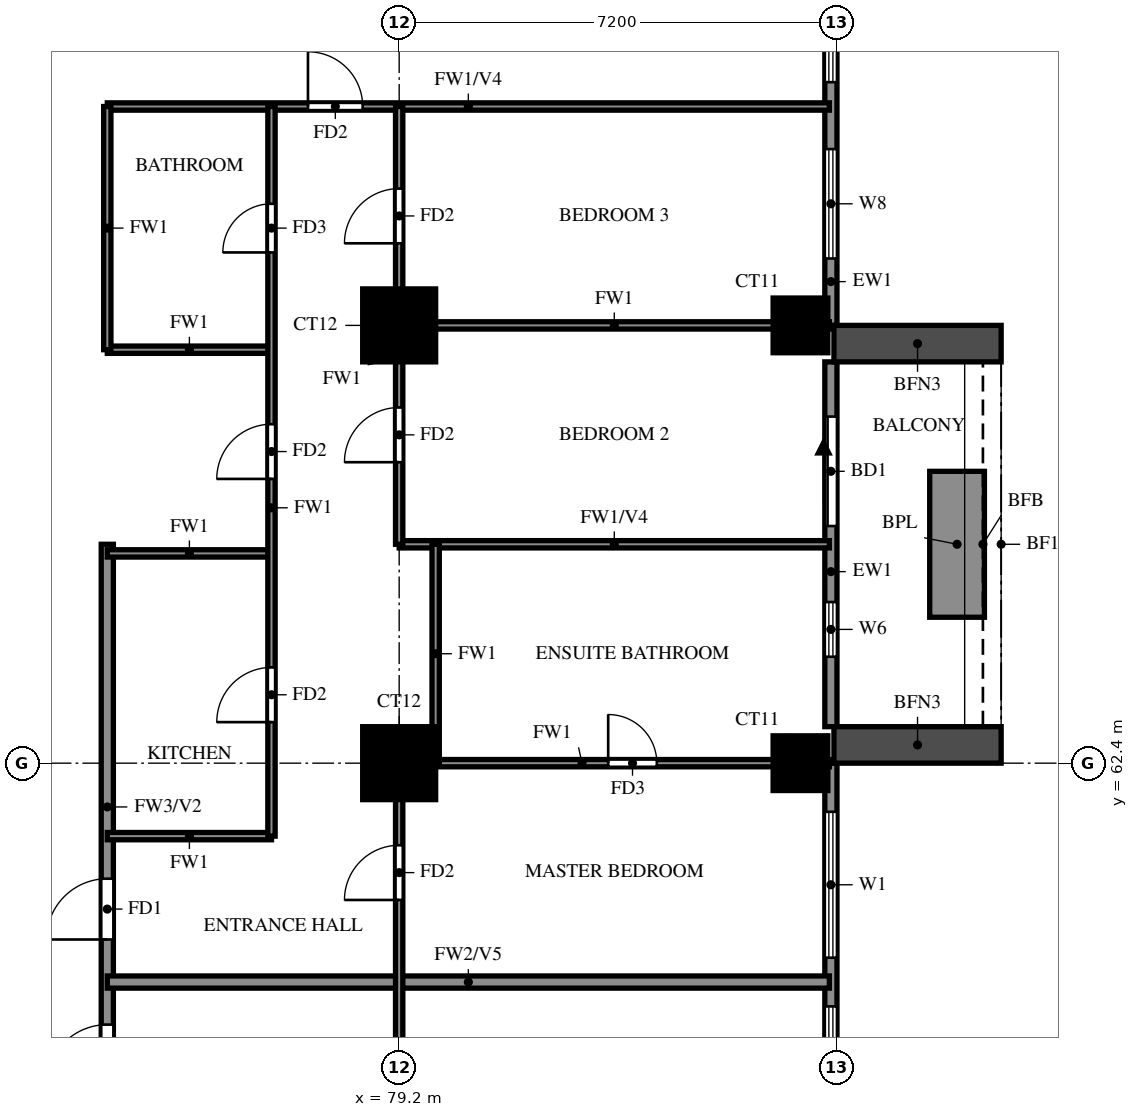
"""IFC4 building model, lengths in metres.
Left out: names, types, materials, properties, quantities, classifications, styles, units other than length and angle.
Written with IfcOpenShell. Run it as: python <this file> out.ifc"""

import sys

from ifc_helpers import new_model, si_unit, direction, frame, frame_2d, origin, origin_2d, place, context, subcontext, project, spatial, rectangle, extrude, source, transform, mapped, element, fill, save


model = new_model("IFC4")
c1 = context("Model", 3, precision=1e-05, world=origin(), true_north=direction((0.0, 1.0)))
c2 = subcontext(c1, "Body", "Model", "MODEL_VIEW")
j1 = project(units=[si_unit("LENGTHUNIT", "METRE"), si_unit("PLANEANGLEUNIT", "RADIAN")], contexts=[c1])
p1 = place(None, origin())
s1 = spatial("IfcSite", under=j1, at=p1, CompositionType="ELEMENT")
p2 = place(p1, origin())
s2 = spatial("IfcBuilding", under=s1, at=p2, CompositionType="ELEMENT")
p3 = place(p2, frame((0.0, 0.0, 97.0)))
s3 = spatial("IfcBuildingStorey", under=s2, at=p3, CompositionType="ELEMENT", Elevation=97.0)
m1 = source(origin(), c2, "Body", "SweptSolid", [
    extrude(rectangle(XDim=1.2, YDim=1.2, at=origin_2d()), origin(), (0.0, 0.0, 1.0), 3.18),
])
p4 = place(p3, frame((79.2, 62.4, 0.0), z_axis=(0.0, 0.0, 1.0), x_axis=(1.0, 0.0, 0.0)))
e1 = element("IfcColumn", 1, at=p4, inside=s3, PredefinedType="COLUMN", context=c2, shape_type="MappedRepresentation", body=[
    mapped(m1, transform((0.0, 0.0, 0.0))),
])
m2 = source(origin(), c2, "Body", "SweptSolid", [
    extrude(rectangle(XDim=0.9, YDim=0.9, at=origin_2d()), origin(), (0.0, 0.0, 1.0), 3.18),
])
p5 = place(p3, frame((85.8, 62.4, 0.0), z_axis=(0.0, 0.0, 1.0), x_axis=(1.0, 0.0, 0.0)))
e2 = element("IfcColumn", 2, at=p5, inside=s3, PredefinedType="COLUMN", context=c2, shape_type="MappedRepresentation", body=[
    mapped(m2, transform((0.0, 0.0, 0.0))),
])
p6 = place(p3, frame((79.2, 69.6, 0.0), z_axis=(0.0, 0.0, 1.0), x_axis=(1.0, 0.0, 0.0)))
e3 = element("IfcColumn", 3, at=p6, inside=s3, PredefinedType="COLUMN", context=c2, shape_type="MappedRepresentation", body=[
    mapped(m1, transform((0.0, 0.0, 0.0))),
])
p7 = place(p3, frame((85.8, 69.6, 0.0), z_axis=(0.0, 0.0, 1.0), x_axis=(1.0, 0.0, 0.0)))
e4 = element("IfcColumn", 4, at=p7, inside=s3, PredefinedType="COLUMN", context=c2, shape_type="MappedRepresentation", body=[
    mapped(m2, transform((0.0, 0.0, 0.0))),
])
p8 = place(p3, frame((86.3, 48.2, 0.0), z_axis=(0.0, 0.0, 1.0), x_axis=(0.0, 1.0, 0.0)))
e5 = element("IfcWall", 5, at=p8, inside=s3, PredefinedType="SOLIDWALL", context=c2, shape_type="SweptSolid", body=[
    extrude(rectangle(XDim=14.2, YDim=0.2, at=frame_2d((7.1, 0.0))), origin(), (0.0, 0.0, 1.0), 3.18),
])
p9 = place(p8, frame((0.6, 0.0, 0.6)))
e6 = element("IfcOpeningElement", 6, at=p9, cuts=e5, PredefinedType="OPENING", context=c2, shape_type="SweptSolid", body=[
    extrude(rectangle(XDim=2.4, YDim=2.4, at=frame_2d((1.2, 1.2))), frame((0.0, 0.11, 0.0), z_axis=(0.0, -1.0, 0.0), x_axis=(1.0, 0.0, 0.0)), (0.0, 0.0, 1.0), 0.22),
])
p10 = place(p8, frame((3.8, 0.0, 0.6)))
e7 = element("IfcOpeningElement", 7, at=p10, cuts=e5, PredefinedType="OPENING", context=c2, shape_type="SweptSolid", body=[
    extrude(rectangle(XDim=2.4, YDim=2.4, at=frame_2d((1.2, 1.2))), frame((0.0, 0.11, 0.0), z_axis=(0.0, -1.0, 0.0), x_axis=(1.0, 0.0, 0.0)), (0.0, 0.0, 1.0), 0.22),
])
p11 = place(p8, frame((7.8, 0.0, 0.6)))
e8 = element("IfcOpeningElement", 8, at=p11, cuts=e5, PredefinedType="OPENING", context=c2, shape_type="SweptSolid", body=[
    extrude(rectangle(XDim=2.4, YDim=2.4, at=frame_2d((1.2, 1.2))), frame((0.0, 0.11, 0.0), z_axis=(0.0, -1.0, 0.0), x_axis=(1.0, 0.0, 0.0)), (0.0, 0.0, 1.0), 0.22),
])
p12 = place(p8, frame((11.0, 0.0, 0.6)))
e9 = element("IfcOpeningElement", 9, at=p12, cuts=e5, PredefinedType="OPENING", context=c2, shape_type="SweptSolid", body=[
    extrude(rectangle(XDim=2.4, YDim=2.4, at=frame_2d((1.2, 1.2))), frame((0.0, 0.11, 0.0), z_axis=(0.0, -1.0, 0.0), x_axis=(1.0, 0.0, 0.0)), (0.0, 0.0, 1.0), 0.22),
])
p13 = place(p3, frame((86.3, 63.0, 0.0), z_axis=(0.0, 0.0, 1.0), x_axis=(0.0, 1.0, 0.0)))
e10 = element("IfcWall", 10, at=p13, inside=s3, PredefinedType="SOLIDWALL", context=c2, shape_type="SweptSolid", body=[
    extrude(rectangle(XDim=6.0, YDim=0.2, at=frame_2d((3.0, 0.0))), origin(), (0.0, 0.0, 1.0), 3.18),
])
p14 = place(p13, frame((3.3, 0.0, 0.0)))
e11 = element("IfcOpeningElement", 11, at=p14, cuts=e10, PredefinedType="OPENING", context=c2, shape_type="SweptSolid", body=[
    extrude(rectangle(XDim=1.8, YDim=2.4, at=frame_2d((0.9, 1.2))), frame((0.0, 0.11, 0.0), z_axis=(0.0, -1.0, 0.0), x_axis=(1.0, 0.0, 0.0)), (0.0, 0.0, 1.0), 0.22),
])
p15 = place(p13, frame((1.15, 0.0, 1.5)))
e12 = element("IfcOpeningElement", 12, at=p15, cuts=e10, PredefinedType="OPENING", context=c2, shape_type="SweptSolid", body=[
    extrude(rectangle(XDim=0.9, YDim=0.9, at=frame_2d((0.45, 0.45))), frame((0.0, 0.11, 0.0), z_axis=(0.0, -1.0, 0.0), x_axis=(1.0, 0.0, 0.0)), (0.0, 0.0, 1.0), 0.22),
])
p16 = place(p3, frame((86.3, 69.6, 0.0), z_axis=(0.0, 0.0, 1.0), x_axis=(0.0, 1.0, 0.0)))
e13 = element("IfcWall", 13, at=p16, inside=s3, PredefinedType="SOLIDWALL", context=c2, shape_type="SweptSolid", body=[
    extrude(rectangle(XDim=7.2, YDim=0.2, at=frame_2d((3.6, 0.0))), origin(), (0.0, 0.0, 1.0), 3.18),
])
p17 = place(p16, frame((1.1, 0.0, 0.6)))
e14 = element("IfcOpeningElement", 14, at=p17, cuts=e13, PredefinedType="OPENING", context=c2, shape_type="SweptSolid", body=[
    extrude(rectangle(XDim=1.8, YDim=2.4, at=frame_2d((0.9, 1.2))), frame((0.0, 0.11, 0.0), z_axis=(0.0, -1.0, 0.0), x_axis=(1.0, 0.0, 0.0)), (0.0, 0.0, 1.0), 0.22),
])
p18 = place(p16, frame((4.0, 0.0, 0.6)))
e15 = element("IfcOpeningElement", 15, at=p18, cuts=e13, PredefinedType="OPENING", context=c2, shape_type="SweptSolid", body=[
    extrude(rectangle(XDim=2.4, YDim=2.4, at=frame_2d((1.2, 1.2))), frame((0.0, 0.11, 0.0), z_axis=(0.0, -1.0, 0.0), x_axis=(1.0, 0.0, 0.0)), (0.0, 0.0, 1.0), 0.22),
])
for number, where, z_axis, x_axis in (
    (16, (86.35, 62.7, 0.0), (0.0, 0.0, 1.0), (1.0, 0.0, 0.0)),
    (17, (86.35, 69.3, 0.0), (0.0, 0.0, 1.0), (1.0, 0.0, 0.0)),
):
    element("IfcWall", number, at=place(p3, frame(where, z_axis=z_axis, x_axis=x_axis)), inside=s3, PredefinedType="SOLIDWALL", context=c2, shape_type="SweptSolid", body=[
        extrude(rectangle(XDim=2.75, YDim=0.6, at=frame_2d((1.375, 0.0))), origin(), (0.0, 0.0, 1.0), 2.85),
    ])
p19 = place(p3, frame((88.375, 64.8, 0.0), z_axis=(0.0, 0.0, 1.0), x_axis=(0.0, 1.0, 0.0)))
e18 = element("IfcWall", 18, at=p19, inside=s3, PredefinedType="SOLIDWALL", context=c2, shape_type="SweptSolid", body=[
    extrude(rectangle(XDim=2.4, YDim=0.9, at=frame_2d((1.2, 0.0))), origin(), (0.0, 0.0, 1.0), 0.9),
])
p20 = place(p3, frame((74.4, 56.4, 0.0), z_axis=(0.0, 0.0, 1.0), x_axis=(0.0, 1.0, 0.0)))
e19 = element("IfcWall", 19, at=p20, inside=s3, PredefinedType="SOLIDWALL", context=c2, shape_type="SweptSolid", body=[
    extrude(rectangle(XDim=9.6, YDim=0.2, at=frame_2d((4.8, 0.0))), origin(), (0.0, 0.0, 1.0), 3.18),
])
p21 = place(p20, frame((0.7, 0.0, 0.0)))
e20 = element("IfcOpeningElement", 20, at=p21, cuts=e19, PredefinedType="OPENING", context=c2, shape_type="SweptSolid", body=[
    extrude(rectangle(XDim=1.0, YDim=2.1, at=frame_2d((0.5, 1.05))), frame((0.0, 0.11, 0.0), z_axis=(0.0, -1.0, 0.0), x_axis=(1.0, 0.0, 0.0)), (0.0, 0.0, 1.0), 0.22),
])
p22 = place(p20, frame((3.1, 0.0, 0.0)))
e21 = element("IfcOpeningElement", 21, at=p22, cuts=e19, PredefinedType="OPENING", context=c2, shape_type="SweptSolid", body=[
    extrude(rectangle(XDim=1.0, YDim=2.1, at=frame_2d((0.5, 1.05))), frame((0.0, 0.11, 0.0), z_axis=(0.0, -1.0, 0.0), x_axis=(1.0, 0.0, 0.0)), (0.0, 0.0, 1.0), 0.22),
])
p23 = place(p3, frame((74.4, 58.8, 0.0), z_axis=(0.0, 0.0, 1.0), x_axis=(1.0, 0.0, 0.0)))
e22 = element("IfcWall", 22, at=p23, inside=s3, PredefinedType="SOLIDWALL", context=c2, shape_type="SweptSolid", body=[
    extrude(rectangle(XDim=11.875, YDim=0.2, at=frame_2d((5.938, 0.0))), origin(), (0.0, 0.0, 1.0), 2.28),
])
p24 = place(p3, frame((74.4, 61.2, 0.0), z_axis=(0.0, 0.0, 1.0), x_axis=(1.0, 0.0, 0.0)))
e23 = element("IfcWall", 23, at=p24, inside=s3, PredefinedType="PARTITIONING", context=c2, shape_type="SweptSolid", body=[
    extrude(rectangle(XDim=2.7, YDim=0.12, at=frame_2d((1.35, 0.0))), origin(), (0.0, 0.0, 1.0), 3.18),
])
p25 = place(p3, frame((79.2, 62.4, 0.0), z_axis=(0.0, 0.0, 1.0), x_axis=(1.0, 0.0, 0.0)))
e24 = element("IfcWall", 24, at=p25, inside=s3, PredefinedType="PARTITIONING", context=c2, shape_type="SweptSolid", body=[
    extrude(rectangle(XDim=7.075, YDim=0.12, at=frame_2d((3.538, 0.0))), origin(), (0.0, 0.0, 1.0), 3.18),
])
p26 = place(p25, frame((3.438, 0.0, 0.0)))
e25 = element("IfcOpeningElement", 25, at=p26, cuts=e24, PredefinedType="OPENING", context=c2, shape_type="SweptSolid", body=[
    extrude(rectangle(XDim=0.8, YDim=2.1, at=frame_2d((0.4, 1.05))), frame((0.0, 0.07, 0.0), z_axis=(0.0, -1.0, 0.0), x_axis=(1.0, 0.0, 0.0)), (0.0, 0.0, 1.0), 0.14),
])
p27 = place(p3, frame((74.4, 65.85, 0.0), z_axis=(0.0, 0.0, 1.0), x_axis=(1.0, 0.0, 0.0)))
e26 = element("IfcWall", 26, at=p27, inside=s3, PredefinedType="PARTITIONING", context=c2, shape_type="SweptSolid", body=[
    extrude(rectangle(XDim=2.7, YDim=0.12, at=frame_2d((1.35, 0.0))), origin(), (0.0, 0.0, 1.0), 3.18),
])
p28 = place(p3, frame((79.2, 66.0, 0.0), z_axis=(0.0, 0.0, 1.0), x_axis=(1.0, 0.0, 0.0)))
e27 = element("IfcWall", 27, at=p28, inside=s3, PredefinedType="PARTITIONING", context=c2, shape_type="SweptSolid", body=[
    extrude(rectangle(XDim=7.075, YDim=0.12, at=frame_2d((3.538, 0.0))), origin(), (0.0, 0.0, 1.0), 2.28),
])
p29 = place(p3, frame((74.4, 69.2, 0.0), z_axis=(0.0, 0.0, 1.0), x_axis=(1.0, 0.0, 0.0)))
e28 = element("IfcWall", 28, at=p29, inside=s3, PredefinedType="PARTITIONING", context=c2, shape_type="SweptSolid", body=[
    extrude(rectangle(XDim=2.7, YDim=0.12, at=frame_2d((1.35, 0.0))), origin(), (0.0, 0.0, 1.0), 3.18),
])
p30 = place(p3, frame((79.2, 69.6, 0.0), z_axis=(0.0, 0.0, 1.0), x_axis=(1.0, 0.0, 0.0)))
e29 = element("IfcWall", 29, at=p30, inside=s3, PredefinedType="PARTITIONING", context=c2, shape_type="SweptSolid", body=[
    extrude(rectangle(XDim=7.075, YDim=0.12, at=frame_2d((3.538, 0.0))), origin(), (0.0, 0.0, 1.0), 3.18),
])
p31 = place(p3, frame((74.4, 73.2, 0.0), z_axis=(0.0, 0.0, 1.0), x_axis=(1.0, 0.0, 0.0)))
e30 = element("IfcWall", 30, at=p31, inside=s3, PredefinedType="PARTITIONING", context=c2, shape_type="SweptSolid", body=[
    extrude(rectangle(XDim=11.875, YDim=0.12, at=frame_2d((5.938, 0.0))), origin(), (0.0, 0.0, 1.0), 2.28),
])
p32 = place(p31, frame((3.3, 0.0, 0.0)))
e31 = element("IfcOpeningElement", 31, at=p32, cuts=e30, PredefinedType="OPENING", context=c2, shape_type="SweptSolid", body=[
    extrude(rectangle(XDim=0.9, YDim=2.1, at=frame_2d((0.45, 1.05))), frame((0.0, 0.07, 0.0), z_axis=(0.0, -1.0, 0.0), x_axis=(1.0, 0.0, 0.0)), (0.0, 0.0, 1.0), 0.14),
])
p33 = place(p3, frame((74.4, 69.2, 0.0), z_axis=(0.0, 0.0, 1.0), x_axis=(0.0, 1.0, 0.0)))
e32 = element("IfcWall", 32, at=p33, inside=s3, PredefinedType="PARTITIONING", context=c2, shape_type="SweptSolid", body=[
    extrude(rectangle(XDim=4.0, YDim=0.12, at=frame_2d((2.0, 0.0))), origin(), (0.0, 0.0, 1.0), 3.18),
])
p34 = place(p3, frame((77.1, 61.2, 0.0), z_axis=(0.0, 0.0, 1.0), x_axis=(0.0, 1.0, 0.0)))
e33 = element("IfcWall", 33, at=p34, inside=s3, PredefinedType="PARTITIONING", context=c2, shape_type="SweptSolid", body=[
    extrude(rectangle(XDim=12.0, YDim=0.12, at=frame_2d((6.0, 0.0))), origin(), (0.0, 0.0, 1.0), 3.18),
])
p35 = place(p34, frame((1.875, 0.0, 0.0)))
e34 = element("IfcOpeningElement", 34, at=p35, cuts=e33, PredefinedType="OPENING", context=c2, shape_type="SweptSolid", body=[
    extrude(rectangle(XDim=0.9, YDim=2.1, at=frame_2d((0.45, 1.05))), frame((0.0, 0.07, 0.0), z_axis=(0.0, -1.0, 0.0), x_axis=(1.0, 0.0, 0.0)), (0.0, 0.0, 1.0), 0.14),
])
p36 = place(p34, frame((5.875, 0.0, 0.0)))
e35 = element("IfcOpeningElement", 35, at=p36, cuts=e33, PredefinedType="OPENING", context=c2, shape_type="SweptSolid", body=[
    extrude(rectangle(XDim=0.9, YDim=2.1, at=frame_2d((0.45, 1.05))), frame((0.0, 0.07, 0.0), z_axis=(0.0, -1.0, 0.0), x_axis=(1.0, 0.0, 0.0)), (0.0, 0.0, 1.0), 0.14),
])
p37 = place(p34, frame((9.6, 0.0, 0.0)))
e36 = element("IfcOpeningElement", 36, at=p37, cuts=e33, PredefinedType="OPENING", context=c2, shape_type="SweptSolid", body=[
    extrude(rectangle(XDim=0.8, YDim=2.1, at=frame_2d((0.4, 1.05))), frame((0.0, 0.07, 0.0), z_axis=(0.0, -1.0, 0.0), x_axis=(1.0, 0.0, 0.0)), (0.0, 0.0, 1.0), 0.14),
])
p38 = place(p3, frame((79.2, 48.125, 0.0), z_axis=(0.0, 0.0, 1.0), x_axis=(0.0, 1.0, 0.0)))
e37 = element("IfcWall", 37, at=p38, inside=s3, PredefinedType="PARTITIONING", context=c2, shape_type="SweptSolid", body=[
    extrude(rectangle(XDim=14.275, YDim=0.12, at=frame_2d((7.137, 0.0))), origin(), (0.0, 0.0, 1.0), 3.18),
])
p39 = place(p38, frame((1.288, 0.0, 0.0)))
e38 = element("IfcOpeningElement", 38, at=p39, cuts=e37, PredefinedType="OPENING", context=c2, shape_type="SweptSolid", body=[
    extrude(rectangle(XDim=0.9, YDim=2.1, at=frame_2d((0.45, 1.05))), frame((0.0, 0.07, 0.0), z_axis=(0.0, -1.0, 0.0), x_axis=(1.0, 0.0, 0.0)), (0.0, 0.0, 1.0), 0.14),
])
p40 = place(p38, frame((7.825, 0.0, 0.0)))
e39 = element("IfcOpeningElement", 39, at=p40, cuts=e37, PredefinedType="OPENING", context=c2, shape_type="SweptSolid", body=[
    extrude(rectangle(XDim=1.5, YDim=2.1, at=frame_2d((0.75, 1.05))), frame((0.0, 0.07, 0.0), z_axis=(0.0, -1.0, 0.0), x_axis=(1.0, 0.0, 0.0)), (0.0, 0.0, 1.0), 0.14),
])
p41 = place(p38, frame((12.025, 0.0, 0.0)))
e40 = element("IfcOpeningElement", 40, at=p41, cuts=e37, PredefinedType="OPENING", context=c2, shape_type="SweptSolid", body=[
    extrude(rectangle(XDim=0.9, YDim=2.1, at=frame_2d((0.45, 1.05))), frame((0.0, 0.07, 0.0), z_axis=(0.0, -1.0, 0.0), x_axis=(1.0, 0.0, 0.0)), (0.0, 0.0, 1.0), 0.14),
])
p42 = place(p3, frame((79.2, 66.0, 0.0), z_axis=(0.0, 0.0, 1.0), x_axis=(0.0, 1.0, 0.0)))
e41 = element("IfcWall", 41, at=p42, inside=s3, PredefinedType="PARTITIONING", context=c2, shape_type="SweptSolid", body=[
    extrude(rectangle(XDim=7.2, YDim=0.12, at=frame_2d((3.6, 0.0))), origin(), (0.0, 0.0, 1.0), 3.18),
])
p43 = place(p42, frame((1.35, 0.0, 0.0)))
e42 = element("IfcOpeningElement", 42, at=p43, cuts=e41, PredefinedType="OPENING", context=c2, shape_type="SweptSolid", body=[
    extrude(rectangle(XDim=0.9, YDim=2.1, at=frame_2d((0.45, 1.05))), frame((0.0, 0.07, 0.0), z_axis=(0.0, -1.0, 0.0), x_axis=(1.0, 0.0, 0.0)), (0.0, 0.0, 1.0), 0.14),
])
p44 = place(p42, frame((4.95, 0.0, 0.0)))
e43 = element("IfcOpeningElement", 43, at=p44, cuts=e41, PredefinedType="OPENING", context=c2, shape_type="SweptSolid", body=[
    extrude(rectangle(XDim=0.9, YDim=2.1, at=frame_2d((0.45, 1.05))), frame((0.0, 0.07, 0.0), z_axis=(0.0, -1.0, 0.0), x_axis=(1.0, 0.0, 0.0)), (0.0, 0.0, 1.0), 0.14),
])
p45 = place(p3, frame((79.8, 62.4, 0.0), z_axis=(0.0, 0.0, 1.0), x_axis=(0.0, 1.0, 0.0)))
e44 = element("IfcWall", 44, at=p45, inside=s3, PredefinedType="PARTITIONING", context=c2, shape_type="SweptSolid", body=[
    extrude(rectangle(XDim=3.6, YDim=0.12, at=frame_2d((1.8, 0.0))), origin(), (0.0, 0.0, 1.0), 3.18),
])
p46 = place(p11, origin())
e45 = element("IfcWindow", 45, at=p46, inside=s3, PartitioningType="DOUBLE_PANEL_VERTICAL", PredefinedType="WINDOW", context=c2, shape_type="SweptSolid", body=[
    extrude(rectangle(XDim=2.4, YDim=2.4, at=frame_2d((1.2, 1.2))), frame((0.0, 0.03, 0.0), z_axis=(0.0, -1.0, 0.0), x_axis=(1.0, 0.0, 0.0)), (0.0, 0.0, 1.0), 0.06),
])
fill(e8, e45)
p47 = place(p12, origin())
e46 = element("IfcWindow", 46, at=p47, inside=s3, PartitioningType="DOUBLE_PANEL_VERTICAL", PredefinedType="WINDOW", context=c2, shape_type="SweptSolid", body=[
    extrude(rectangle(XDim=2.4, YDim=2.4, at=frame_2d((1.2, 1.2))), frame((0.0, 0.03, 0.0), z_axis=(0.0, -1.0, 0.0), x_axis=(1.0, 0.0, 0.0)), (0.0, 0.0, 1.0), 0.06),
])
fill(e9, e46)
p48 = place(p14, origin())
e47 = element("IfcDoor", 47, at=p48, inside=s3, OperationType="DOUBLE_DOOR_SLIDING", PredefinedType="DOOR", context=c2, shape_type="SweptSolid", body=[
    extrude(rectangle(XDim=1.8, YDim=2.4, at=frame_2d((0.9, 1.2))), frame((0.0, 0.025, 0.0), z_axis=(0.0, -1.0, 0.0), x_axis=(1.0, 0.0, 0.0)), (0.0, 0.0, 1.0), 0.05),
])
fill(e11, e47)
p49 = place(p15, origin())
e48 = element("IfcWindow", 48, at=p49, inside=s3, PartitioningType="SINGLE_PANEL", PredefinedType="WINDOW", context=c2, shape_type="SweptSolid", body=[
    extrude(rectangle(XDim=0.9, YDim=0.9, at=frame_2d((0.45, 0.45))), frame((0.0, 0.03, 0.0), z_axis=(0.0, -1.0, 0.0), x_axis=(1.0, 0.0, 0.0)), (0.0, 0.0, 1.0), 0.06),
])
fill(e12, e48)
p50 = place(p17, origin())
e49 = element("IfcWindow", 49, at=p50, inside=s3, PartitioningType="DOUBLE_PANEL_VERTICAL", PredefinedType="WINDOW", context=c2, shape_type="SweptSolid", body=[
    extrude(rectangle(XDim=1.8, YDim=2.4, at=frame_2d((0.9, 1.2))), frame((0.0, 0.03, 0.0), z_axis=(0.0, -1.0, 0.0), x_axis=(1.0, 0.0, 0.0)), (0.0, 0.0, 1.0), 0.06),
])
fill(e14, e49)
p51 = place(p18, origin())
e50 = element("IfcWindow", 50, at=p51, inside=s3, PartitioningType="DOUBLE_PANEL_VERTICAL", PredefinedType="WINDOW", context=c2, shape_type="SweptSolid", body=[
    extrude(rectangle(XDim=2.4, YDim=2.4, at=frame_2d((1.2, 1.2))), frame((0.0, 0.03, 0.0), z_axis=(0.0, -1.0, 0.0), x_axis=(1.0, 0.0, 0.0)), (0.0, 0.0, 1.0), 0.06),
])
fill(e15, e50)
p52 = place(p21, origin())
e51 = element("IfcDoor", 51, at=p52, inside=s3, OperationType="SINGLE_SWING_LEFT", PredefinedType="DOOR", context=c2, shape_type="SweptSolid", body=[
    extrude(rectangle(XDim=1.0, YDim=2.1, at=frame_2d((0.5, 1.05))), frame((0.0, 0.025, 0.0), z_axis=(0.0, -1.0, 0.0), x_axis=(1.0, 0.0, 0.0)), (0.0, 0.0, 1.0), 0.05),
])
fill(e20, e51)
p53 = place(p22, origin())
e52 = element("IfcDoor", 52, at=p53, inside=s3, OperationType="SINGLE_SWING_LEFT", PredefinedType="DOOR", context=c2, shape_type="SweptSolid", body=[
    extrude(rectangle(XDim=1.0, YDim=2.1, at=frame_2d((0.5, 1.05))), frame((0.0, 0.025, 0.0), z_axis=(0.0, -1.0, 0.0), x_axis=(1.0, 0.0, 0.0)), (0.0, 0.0, 1.0), 0.05),
])
fill(e21, e52)
p54 = place(p41, origin())
e53 = element("IfcDoor", 53, at=p54, inside=s3, OperationType="SINGLE_SWING_RIGHT", PredefinedType="DOOR", context=c2, shape_type="SweptSolid", body=[
    extrude(rectangle(XDim=0.9, YDim=2.1, at=frame_2d((0.45, 1.05))), frame((0.0, 0.025, 0.0), z_axis=(0.0, -1.0, 0.0), x_axis=(1.0, 0.0, 0.0)), (0.0, 0.0, 1.0), 0.05),
])
fill(e40, e53)
p55 = place(p26, origin())
e54 = element("IfcDoor", 54, at=p55, inside=s3, OperationType="SINGLE_SWING_LEFT", PredefinedType="DOOR", context=c2, shape_type="SweptSolid", body=[
    extrude(rectangle(XDim=0.8, YDim=2.1, at=frame_2d((0.4, 1.05))), frame((0.0, 0.025, 0.0), z_axis=(0.0, -1.0, 0.0), x_axis=(1.0, 0.0, 0.0)), (0.0, 0.0, 1.0), 0.05),
])
fill(e25, e54)
p56 = place(p43, origin())
e55 = element("IfcDoor", 55, at=p56, inside=s3, OperationType="SINGLE_SWING_LEFT", PredefinedType="DOOR", context=c2, shape_type="SweptSolid", body=[
    extrude(rectangle(XDim=0.9, YDim=2.1, at=frame_2d((0.45, 1.05))), frame((0.0, 0.025, 0.0), z_axis=(0.0, -1.0, 0.0), x_axis=(1.0, 0.0, 0.0)), (0.0, 0.0, 1.0), 0.05),
])
fill(e42, e55)
p57 = place(p44, origin())
e56 = element("IfcDoor", 56, at=p57, inside=s3, OperationType="SINGLE_SWING_RIGHT", PredefinedType="DOOR", context=c2, shape_type="SweptSolid", body=[
    extrude(rectangle(XDim=0.9, YDim=2.1, at=frame_2d((0.45, 1.05))), frame((0.0, 0.025, 0.0), z_axis=(0.0, -1.0, 0.0), x_axis=(1.0, 0.0, 0.0)), (0.0, 0.0, 1.0), 0.05),
])
fill(e43, e56)
p58 = place(p32, origin())
e57 = element("IfcDoor", 57, at=p58, inside=s3, OperationType="SINGLE_SWING_LEFT", PredefinedType="DOOR", context=c2, shape_type="SweptSolid", body=[
    extrude(rectangle(XDim=0.9, YDim=2.1, at=frame_2d((0.45, 1.05))), frame((0.0, 0.025, 0.0), z_axis=(0.0, -1.0, 0.0), x_axis=(1.0, 0.0, 0.0)), (0.0, 0.0, 1.0), 0.05),
])
fill(e31, e57)
p59 = place(p35, origin())
e58 = element("IfcDoor", 58, at=p59, inside=s3, OperationType="SINGLE_SWING_LEFT", PredefinedType="DOOR", context=c2, shape_type="SweptSolid", body=[
    extrude(rectangle(XDim=0.9, YDim=2.1, at=frame_2d((0.45, 1.05))), frame((0.0, 0.025, 0.0), z_axis=(0.0, -1.0, 0.0), x_axis=(1.0, 0.0, 0.0)), (0.0, 0.0, 1.0), 0.05),
])
fill(e34, e58)
p60 = place(p36, origin())
e59 = element("IfcDoor", 59, at=p60, inside=s3, OperationType="SINGLE_SWING_RIGHT", PredefinedType="DOOR", context=c2, shape_type="SweptSolid", body=[
    extrude(rectangle(XDim=0.9, YDim=2.1, at=frame_2d((0.45, 1.05))), frame((0.0, 0.025, 0.0), z_axis=(0.0, -1.0, 0.0), x_axis=(1.0, 0.0, 0.0)), (0.0, 0.0, 1.0), 0.05),
])
fill(e35, e59)
p61 = place(p37, origin())
e60 = element("IfcDoor", 60, at=p61, inside=s3, OperationType="SINGLE_SWING_LEFT", PredefinedType="DOOR", context=c2, shape_type="SweptSolid", body=[
    extrude(rectangle(XDim=0.8, YDim=2.1, at=frame_2d((0.4, 1.05))), frame((0.0, 0.025, 0.0), z_axis=(0.0, -1.0, 0.0), x_axis=(1.0, 0.0, 0.0)), (0.0, 0.0, 1.0), 0.05),
])
fill(e36, e60)
save(model, sys.argv[1])
